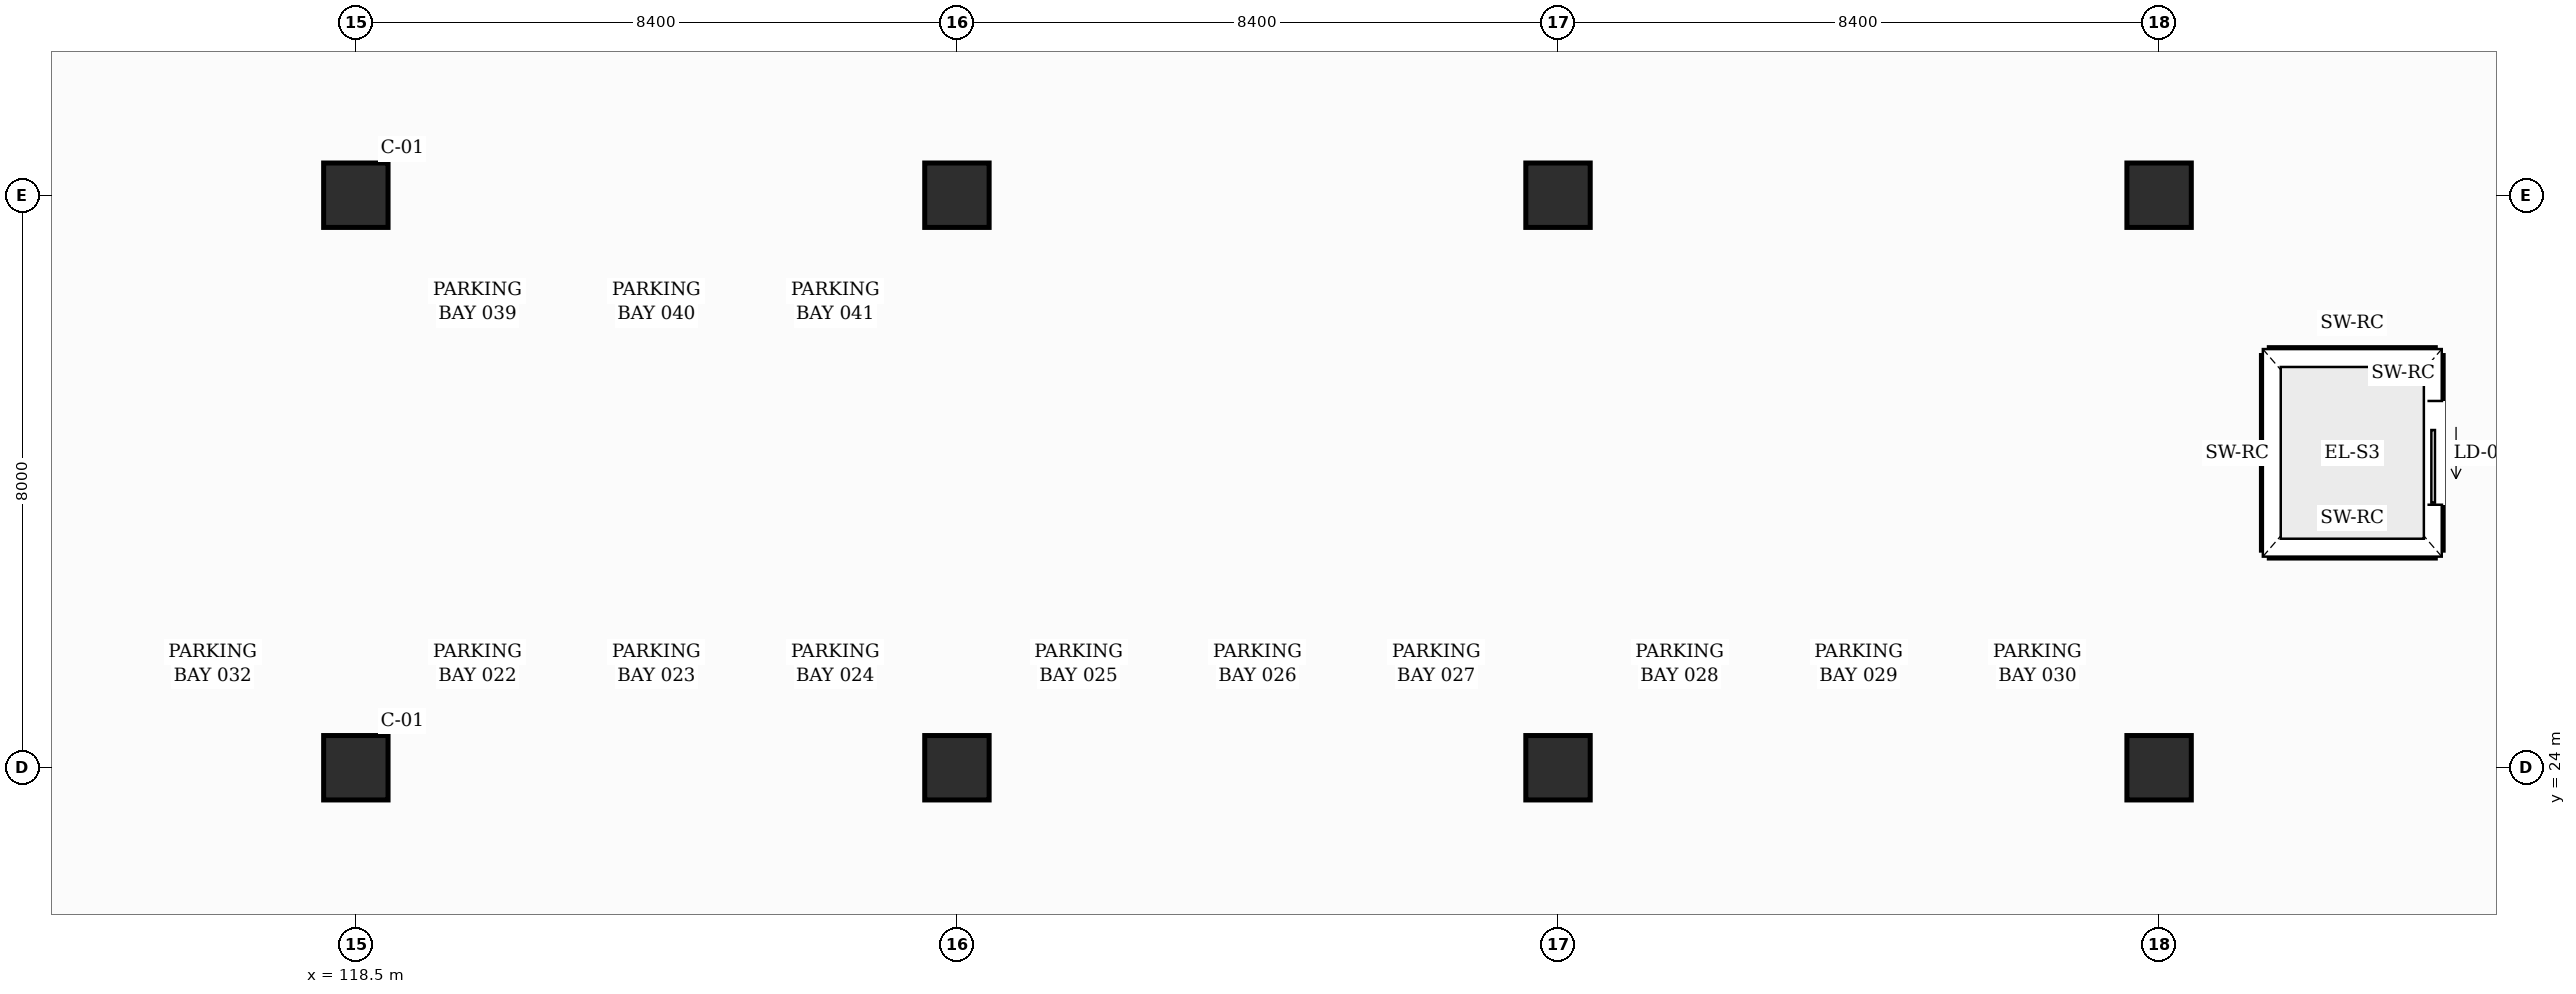
"""IFC4 building model, lengths in metres.
Left out: names, types, materials, properties, quantities, classifications, styles, units other than length and angle.
Written with IfcOpenShell. Run it as: python <this file> out.ifc"""

import sys

from ifc_helpers import new_model, si_unit, direction, frame, frame_2d, origin, origin_2d, place, context, subcontext, project, spatial, rectangle, hollow_rectangle, extrude, element, fill, save


model = new_model("IFC4")
c1 = context("Model", 3, precision=1e-05, world=origin(), true_north=direction((0.0, 1.0)))
c2 = subcontext(c1, "Body", "Model", "MODEL_VIEW")
j1 = project(units=[si_unit("LENGTHUNIT", "METRE"), si_unit("PLANEANGLEUNIT", "RADIAN")], contexts=[c1])
p1 = place(None, origin())
s1 = spatial("IfcSite", under=j1, at=p1, CompositionType="ELEMENT")
p2 = place(p1, origin())
s2 = spatial("IfcBuilding", under=s1, at=p2, CompositionType="ELEMENT")
p3 = place(p2, frame((0.0, 0.0, -5.4)))
s3 = spatial("IfcBuildingStorey", under=s2, at=p3, CompositionType="ELEMENT", Elevation=-5.4)
for number, where, z_axis, x_axis in (
    (1, (118.5, 24.0, 0.0), (0.0, 0.0, 1.0), (1.0, 0.0, 0.0)),
    (2, (118.5, 32.0, 0.0), (0.0, 0.0, 1.0), (1.0, 0.0, 0.0)),
    (3, (126.9, 24.0, 0.0), (0.0, 0.0, 1.0), (1.0, 0.0, 0.0)),
    (4, (126.9, 32.0, 0.0), (0.0, 0.0, 1.0), (1.0, 0.0, 0.0)),
    (5, (135.3, 24.0, 0.0), (0.0, 0.0, 1.0), (1.0, 0.0, 0.0)),
    (6, (135.3, 32.0, 0.0), (0.0, 0.0, 1.0), (1.0, 0.0, 0.0)),
    (7, (143.7, 24.0, 0.0), (0.0, 0.0, 1.0), (1.0, 0.0, 0.0)),
    (8, (143.7, 32.0, 0.0), (0.0, 0.0, 1.0), (1.0, 0.0, 0.0)),
):
    element("IfcColumn", number, at=place(p3, frame(where, z_axis=z_axis, x_axis=x_axis)), inside=s3, PredefinedType="COLUMN", context=c2, shape_type="SweptSolid", body=[
        extrude(hollow_rectangle(XDim=0.9, YDim=0.9, WallThickness=0.032, InnerFilletRadius=0.032, OuterFilletRadius=0.064, at=origin_2d()), origin(), (0.0, 0.0, 1.0), 5.4),
    ])
for number, where, z_axis, x_axis in (
    (9, (145.24, 29.76, 0.0), (0.0, 0.0, 1.0), (1.0, 0.0, 0.0)),
    (10, (145.24, 27.04, 0.0), (0.0, 0.0, 1.0), (1.0, 0.0, 0.0)),
):
    element("IfcWall", number, at=place(p3, frame(where, z_axis=z_axis, x_axis=x_axis)), inside=s3, PredefinedType="SHEAR", context=c2, shape_type="SweptSolid", body=[
        extrude(rectangle(XDim=2.32, YDim=0.22, at=frame_2d((1.16, 0.0))), origin(), (0.0, 0.0, 1.0), 5.12),
    ])
p4 = place(p3, frame((147.56, 27.04, 0.0), z_axis=(0.0, 0.0, 1.0), x_axis=(0.0, 1.0, 0.0)))
e11 = element("IfcWall", 11, at=p4, inside=s3, PredefinedType="SHEAR", context=c2, shape_type="SweptSolid", body=[
    extrude(rectangle(XDim=2.72, YDim=0.22, at=frame_2d((1.36, 0.0))), origin(), (0.0, 0.0, 1.0), 5.12),
])
p5 = place(p4, frame((0.635, 0.0, 0.0)))
e12 = element("IfcOpeningElement", 12, at=p5, cuts=e11, PredefinedType="OPENING", context=c2, shape_type="SweptSolid", body=[
    extrude(rectangle(XDim=1.45, YDim=2.35, at=frame_2d((0.725, 1.175))), frame((0.0, 0.12, 0.0), z_axis=(0.0, -1.0, 0.0), x_axis=(1.0, 0.0, 0.0)), (0.0, 0.0, 1.0), 0.24),
])
p6 = place(p3, frame((145.24, 27.04, 0.0), z_axis=(0.0, 0.0, 1.0), x_axis=(0.0, 1.0, 0.0)))
e13 = element("IfcWall", 13, at=p6, inside=s3, PredefinedType="SHEAR", context=c2, shape_type="SweptSolid", body=[
    extrude(rectangle(XDim=2.72, YDim=0.22, at=frame_2d((1.36, 0.0))), origin(), (0.0, 0.0, 1.0), 5.12),
])
p7 = place(p5, origin())
e14 = element("IfcDoor", 14, at=p7, inside=s3, OperationType="SLIDING_TO_LEFT", PredefinedType="DOOR", context=c2, shape_type="SweptSolid", body=[
    extrude(rectangle(XDim=1.45, YDim=2.35, at=frame_2d((0.725, 1.175))), frame((0.0, 0.025, 0.0), z_axis=(0.0, -1.0, 0.0), x_axis=(1.0, 0.0, 0.0)), (0.0, 0.0, 1.0), 0.05),
])
fill(e12, e14)
save(model, sys.argv[1])
